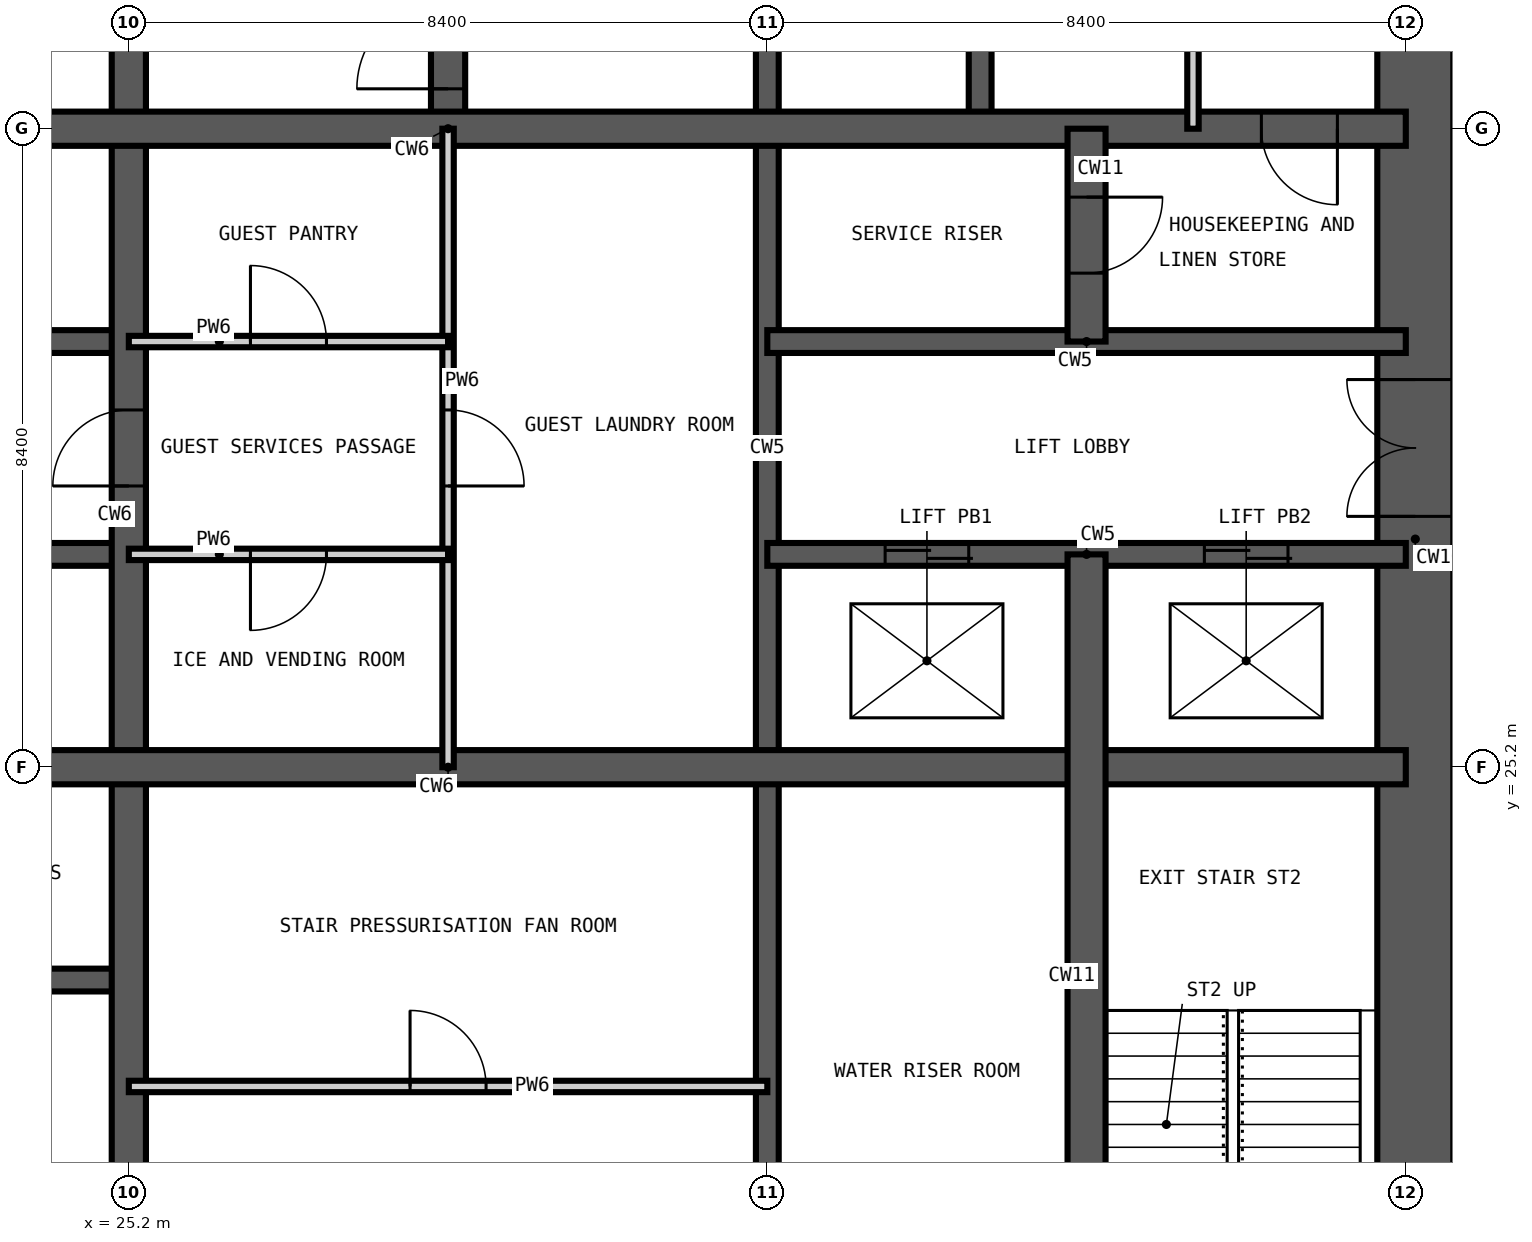
"""IFC4 building model, lengths in metres.
Left out: names, types, materials, properties, quantities, classifications, styles, units other than length and angle.
Written with IfcOpenShell. Run it as: python <this file> out.ifc"""

import sys

from ifc_helpers import new_model, si_unit, direction, frame, frame_2d, origin, place, context, subcontext, project, spatial, rectangle, extrude, element, fill, save


model = new_model("IFC4")
c1 = context("Model", 3, precision=1e-05, world=origin(), true_north=direction((0.0, 1.0)))
c2 = subcontext(c1, "Body", "Model", "MODEL_VIEW")
j1 = project(units=[si_unit("LENGTHUNIT", "METRE"), si_unit("PLANEANGLEUNIT", "RADIAN")], contexts=[c1])
p1 = place(None, origin())
s1 = spatial("IfcSite", under=j1, at=p1, CompositionType="ELEMENT")
p2 = place(p1, origin())
s2 = spatial("IfcBuilding", under=s1, at=p2, CompositionType="ELEMENT")
p3 = place(p2, frame((0.0, 0.0, 122.4)))
s3 = spatial("IfcBuildingStorey", under=s2, at=p3, CompositionType="ELEMENT", Elevation=122.4)
p4 = place(p3, frame((42.125, 17.175, -0.35), z_axis=(0.0, 0.0, 1.0), x_axis=(0.0, 1.0, 0.0)))
e1 = element("IfcWall", 1, at=p4, inside=s3, PredefinedType="SHEAR", context=c2, shape_type="SweptSolid", body=[
    extrude(rectangle(XDim=24.45, YDim=1.0, at=frame_2d((12.225, 0.0))), origin(), (0.0, 0.0, 1.0), 3.6),
])
p5 = place(p4, frame((0.425, 0.0, 0.35)))
e2 = element("IfcOpeningElement", 2, at=p5, cuts=e1, PredefinedType="OPENING", context=c2, shape_type="SweptSolid", body=[
    extrude(rectangle(XDim=1.2, YDim=2.2, at=frame_2d((0.6, 1.1))), frame((0.0, 0.51, 0.0), z_axis=(0.0, -1.0, 0.0), x_axis=(1.0, 0.0, 0.0)), (0.0, 0.0, 1.0), 1.02),
])
p6 = place(p4, frame((11.325, 0.0, 0.35)))
e3 = element("IfcOpeningElement", 3, at=p6, cuts=e1, PredefinedType="OPENING", context=c2, shape_type="SweptSolid", body=[
    extrude(rectangle(XDim=1.8, YDim=2.2, at=frame_2d((0.9, 1.1))), frame((0.0, 0.51, 0.0), z_axis=(0.0, -1.0, 0.0), x_axis=(1.0, 0.0, 0.0)), (0.0, 0.0, 1.0), 1.02),
])
p7 = place(p4, frame((20.125, 0.0, 0.35)))
e4 = element("IfcOpeningElement", 4, at=p7, cuts=e1, PredefinedType="OPENING", context=c2, shape_type="SweptSolid", body=[
    extrude(rectangle(XDim=1.0, YDim=2.1, at=frame_2d((0.5, 1.05))), frame((0.0, 0.51, 0.0), z_axis=(0.0, -1.0, 0.0), x_axis=(1.0, 0.0, 0.0)), (0.0, 0.0, 1.0), 1.02),
])
p8 = place(p3, frame((33.6, 16.8, -0.35), z_axis=(0.0, 0.0, 1.0), x_axis=(0.0, 1.0, 0.0)))
e5 = element("IfcWall", 5, at=p8, inside=s3, PredefinedType="SHEAR", context=c2, shape_type="SweptSolid", body=[
    extrude(rectangle(XDim=25.2, YDim=0.3, at=frame_2d((12.6, 0.0))), origin(), (0.0, 0.0, 1.0), 3.6),
])
p9 = place(p8, frame((22.5, 0.0, 0.35)))
e6 = element("IfcOpeningElement", 6, at=p9, cuts=e5, PredefinedType="OPENING", context=c2, shape_type="SweptSolid", body=[
    extrude(rectangle(XDim=1.2, YDim=2.2, at=frame_2d((0.6, 1.1))), frame((0.0, 0.16, 0.0), z_axis=(0.0, -1.0, 0.0), x_axis=(1.0, 0.0, 0.0)), (0.0, 0.0, 1.0), 0.32),
])
p10 = place(p8, frame((18.3, 0.0, 0.35)))
e7 = element("IfcOpeningElement", 7, at=p10, cuts=e5, PredefinedType="OPENING", context=c2, shape_type="SweptSolid", body=[
    extrude(rectangle(XDim=1.2, YDim=2.2, at=frame_2d((0.6, 1.1))), frame((0.0, 0.16, 0.0), z_axis=(0.0, -1.0, 0.0), x_axis=(1.0, 0.0, 0.0)), (0.0, 0.0, 1.0), 0.32),
])
for number, where, z_axis, x_axis in (
    (8, (36.4, 33.6, -0.35), (0.0, 0.0, 1.0), (0.0, 1.0, 0.0)),
    (9, (16.8, 22.4, -0.35), (0.0, 0.0, 1.0), (1.0, 0.0, 0.0)),
):
    element("IfcWall", number, at=place(p3, frame(where, z_axis=z_axis, x_axis=x_axis)), inside=s3, PredefinedType="SHEAR", context=c2, shape_type="SweptSolid", body=[
        extrude(rectangle(XDim=8.4, YDim=0.3, at=frame_2d((4.2, 0.0))), origin(), (0.0, 0.0, 1.0), 3.6),
    ])
p11 = place(p3, frame((16.8, 28.0, -0.35), z_axis=(0.0, 0.0, 1.0), x_axis=(1.0, 0.0, 0.0)))
e10 = element("IfcWall", 10, at=p11, inside=s3, PredefinedType="SHEAR", context=c2, shape_type="SweptSolid", body=[
    extrude(rectangle(XDim=8.4, YDim=0.3, at=frame_2d((4.2, 0.0))), origin(), (0.0, 0.0, 1.0), 3.6),
])
p12 = place(p11, frame((1.55, 0.0, 0.35)))
e11 = element("IfcOpeningElement", 11, at=p12, cuts=e10, PredefinedType="OPENING", context=c2, shape_type="SweptSolid", body=[
    extrude(rectangle(XDim=1.1, YDim=2.2, at=frame_2d((0.55, 1.1))), frame((0.0, 0.16, 0.0), z_axis=(0.0, -1.0, 0.0), x_axis=(1.0, 0.0, 0.0)), (0.0, 0.0, 1.0), 0.32),
])
p13 = place(p11, frame((5.75, 0.0, 0.35)))
e12 = element("IfcOpeningElement", 12, at=p13, cuts=e10, PredefinedType="OPENING", context=c2, shape_type="SweptSolid", body=[
    extrude(rectangle(XDim=1.1, YDim=2.2, at=frame_2d((0.55, 1.1))), frame((0.0, 0.16, 0.0), z_axis=(0.0, -1.0, 0.0), x_axis=(1.0, 0.0, 0.0)), (0.0, 0.0, 1.0), 0.32),
])
p14 = place(p3, frame((33.6, 28.0, -0.35), z_axis=(0.0, 0.0, 1.0), x_axis=(1.0, 0.0, 0.0)))
e13 = element("IfcWall", 13, at=p14, inside=s3, PredefinedType="SHEAR", context=c2, shape_type="SweptSolid", body=[
    extrude(rectangle(XDim=8.4, YDim=0.3, at=frame_2d((4.2, 0.0))), origin(), (0.0, 0.0, 1.0), 3.6),
])
p15 = place(p14, frame((1.55, 0.0, 0.35)))
e14 = element("IfcOpeningElement", 14, at=p15, cuts=e13, PredefinedType="OPENING", context=c2, shape_type="SweptSolid", body=[
    extrude(rectangle(XDim=1.1, YDim=2.2, at=frame_2d((0.55, 1.1))), frame((0.0, 0.16, 0.0), z_axis=(0.0, -1.0, 0.0), x_axis=(1.0, 0.0, 0.0)), (0.0, 0.0, 1.0), 0.32),
])
p16 = place(p14, frame((5.75, 0.0, 0.35)))
e15 = element("IfcOpeningElement", 15, at=p16, cuts=e13, PredefinedType="OPENING", context=c2, shape_type="SweptSolid", body=[
    extrude(rectangle(XDim=1.1, YDim=2.2, at=frame_2d((0.55, 1.1))), frame((0.0, 0.16, 0.0), z_axis=(0.0, -1.0, 0.0), x_axis=(1.0, 0.0, 0.0)), (0.0, 0.0, 1.0), 0.32),
])
p17 = place(p3, frame((16.8, 30.8, -0.35), z_axis=(0.0, 0.0, 1.0), x_axis=(1.0, 0.0, 0.0)))
e16 = element("IfcWall", 16, at=p17, inside=s3, PredefinedType="SHEAR", context=c2, shape_type="SweptSolid", body=[
    extrude(rectangle(XDim=8.4, YDim=0.3, at=frame_2d((4.2, 0.0))), origin(), (0.0, 0.0, 1.0), 3.6),
])
p18 = place(p17, frame((1.55, 0.0, 0.35)))
e17 = element("IfcOpeningElement", 17, at=p18, cuts=e16, PredefinedType="OPENING", context=c2, shape_type="SweptSolid", body=[
    extrude(rectangle(XDim=1.1, YDim=2.2, at=frame_2d((0.55, 1.1))), frame((0.0, 0.16, 0.0), z_axis=(0.0, -1.0, 0.0), x_axis=(1.0, 0.0, 0.0)), (0.0, 0.0, 1.0), 0.32),
])
p19 = place(p17, frame((5.75, 0.0, 0.35)))
e18 = element("IfcOpeningElement", 18, at=p19, cuts=e16, PredefinedType="OPENING", context=c2, shape_type="SweptSolid", body=[
    extrude(rectangle(XDim=1.1, YDim=2.2, at=frame_2d((0.55, 1.1))), frame((0.0, 0.16, 0.0), z_axis=(0.0, -1.0, 0.0), x_axis=(1.0, 0.0, 0.0)), (0.0, 0.0, 1.0), 0.32),
])
p20 = place(p3, frame((33.6, 30.8, -0.35), z_axis=(0.0, 0.0, 1.0), x_axis=(1.0, 0.0, 0.0)))
e19 = element("IfcWall", 19, at=p20, inside=s3, PredefinedType="SHEAR", context=c2, shape_type="SweptSolid", body=[
    extrude(rectangle(XDim=8.4, YDim=0.3, at=frame_2d((4.2, 0.0))), origin(), (0.0, 0.0, 1.0), 3.6),
])
p21 = place(p3, frame((25.2, 16.8, -0.35), z_axis=(0.0, 0.0, 1.0), x_axis=(0.0, 1.0, 0.0)))
e20 = element("IfcWall", 20, at=p21, inside=s3, PredefinedType="SHEAR", context=c2, shape_type="SweptSolid", body=[
    extrude(rectangle(XDim=25.2, YDim=0.45, at=frame_2d((12.6, 0.0))), origin(), (0.0, 0.0, 1.0), 3.6),
])
p22 = place(p21, frame((12.1, 0.0, 0.35)))
e21 = element("IfcOpeningElement", 21, at=p22, cuts=e20, PredefinedType="OPENING", context=c2, shape_type="SweptSolid", body=[
    extrude(rectangle(XDim=1.0, YDim=2.1, at=frame_2d((0.5, 1.05))), frame((0.0, 0.235, 0.0), z_axis=(0.0, -1.0, 0.0), x_axis=(1.0, 0.0, 0.0)), (0.0, 0.0, 1.0), 0.47),
])
p23 = place(p3, frame((29.4, 33.6, -0.35), z_axis=(0.0, 0.0, 1.0), x_axis=(0.0, 1.0, 0.0)))
e22 = element("IfcWall", 22, at=p23, inside=s3, PredefinedType="SHEAR", context=c2, shape_type="SweptSolid", body=[
    extrude(rectangle(XDim=8.4, YDim=0.45, at=frame_2d((4.2, 0.0))), origin(), (0.0, 0.0, 1.0), 3.6),
])
p24 = place(p23, frame((0.525, 0.0, 0.35)))
e23 = element("IfcOpeningElement", 23, at=p24, cuts=e22, PredefinedType="OPENING", context=c2, shape_type="SweptSolid", body=[
    extrude(rectangle(XDim=1.2, YDim=2.2, at=frame_2d((0.6, 1.1))), frame((0.0, 0.235, 0.0), z_axis=(0.0, -1.0, 0.0), x_axis=(1.0, 0.0, 0.0)), (0.0, 0.0, 1.0), 0.47),
])
p25 = place(p3, frame((16.8, 25.2, -0.35), z_axis=(0.0, 0.0, 1.0), x_axis=(1.0, 0.0, 0.0)))
e24 = element("IfcWall", 24, at=p25, inside=s3, PredefinedType="SHEAR", context=c2, shape_type="SweptSolid", body=[
    extrude(rectangle(XDim=25.2, YDim=0.45, at=frame_2d((12.6, 0.0))), origin(), (0.0, 0.0, 1.0), 3.6),
])
p26 = place(p3, frame((16.8, 33.6, -0.35), z_axis=(0.0, 0.0, 1.0), x_axis=(1.0, 0.0, 0.0)))
e25 = element("IfcWall", 25, at=p26, inside=s3, PredefinedType="SHEAR", context=c2, shape_type="SweptSolid", body=[
    extrude(rectangle(XDim=25.2, YDim=0.45, at=frame_2d((12.6, 0.0))), origin(), (0.0, 0.0, 1.0), 3.6),
])
p27 = place(p26, frame((23.3, 0.0, 0.35)))
e26 = element("IfcOpeningElement", 26, at=p27, cuts=e25, PredefinedType="OPENING", context=c2, shape_type="SweptSolid", body=[
    extrude(rectangle(XDim=1.0, YDim=2.1, at=frame_2d((0.5, 1.05))), frame((0.0, 0.235, 0.0), z_axis=(0.0, -1.0, 0.0), x_axis=(1.0, 0.0, 0.0)), (0.0, 0.0, 1.0), 0.47),
])
p28 = place(p3, frame((37.8, 16.8, -0.35), z_axis=(0.0, 0.0, 1.0), x_axis=(0.0, 1.0, 0.0)))
e27 = element("IfcWall", 27, at=p28, inside=s3, PredefinedType="SHEAR", context=c2, shape_type="SweptSolid", body=[
    extrude(rectangle(XDim=11.2, YDim=0.5, at=frame_2d((5.6, 0.0))), origin(), (0.0, 0.0, 1.0), 3.6),
])
p29 = place(p3, frame((37.8, 30.8, -0.35), z_axis=(0.0, 0.0, 1.0), x_axis=(0.0, 1.0, 0.0)))
e28 = element("IfcWall", 28, at=p29, inside=s3, PredefinedType="SHEAR", context=c2, shape_type="SweptSolid", body=[
    extrude(rectangle(XDim=2.8, YDim=0.5, at=frame_2d((1.4, 0.0))), origin(), (0.0, 0.0, 1.0), 3.6),
])
p30 = place(p29, frame((0.9, 0.0, 0.35)))
e29 = element("IfcOpeningElement", 29, at=p30, cuts=e28, PredefinedType="OPENING", context=c2, shape_type="SweptSolid", body=[
    extrude(rectangle(XDim=1.0, YDim=2.1, at=frame_2d((0.5, 1.05))), frame((0.0, 0.26, 0.0), z_axis=(0.0, -1.0, 0.0), x_axis=(1.0, 0.0, 0.0)), (0.0, 0.0, 1.0), 0.52),
])
p31 = place(p3, frame((29.4, 25.2, 0.0), z_axis=(0.0, 0.0, 1.0), x_axis=(0.0, 1.0, 0.0)))
e30 = element("IfcWall", 30, at=p31, inside=s3, PredefinedType="PARTITIONING", context=c2, shape_type="SweptSolid", body=[
    extrude(rectangle(XDim=8.4, YDim=0.15, at=frame_2d((4.2, 0.0))), origin(), (0.0, 0.0, 1.0), 3.25),
])
p32 = place(p31, frame((3.7, 0.0, 0.0)))
e31 = element("IfcOpeningElement", 31, at=p32, cuts=e30, PredefinedType="OPENING", context=c2, shape_type="SweptSolid", body=[
    extrude(rectangle(XDim=1.0, YDim=2.1, at=frame_2d((0.5, 1.05))), frame((0.0, 0.085, 0.0), z_axis=(0.0, -1.0, 0.0), x_axis=(1.0, 0.0, 0.0)), (0.0, 0.0, 1.0), 0.17),
])
p33 = place(p3, frame((39.2, 33.6, 0.0), z_axis=(0.0, 0.0, 1.0), x_axis=(0.0, 1.0, 0.0)))
e32 = element("IfcWall", 32, at=p33, inside=s3, PredefinedType="PARTITIONING", context=c2, shape_type="SweptSolid", body=[
    extrude(rectangle(XDim=8.4, YDim=0.15, at=frame_2d((4.2, 0.0))), origin(), (0.0, 0.0, 1.0), 3.25),
])
p34 = place(p33, frame((3.7, 0.0, 0.0)))
e33 = element("IfcOpeningElement", 33, at=p34, cuts=e32, PredefinedType="OPENING", context=c2, shape_type="SweptSolid", body=[
    extrude(rectangle(XDim=1.0, YDim=2.1, at=frame_2d((0.5, 1.05))), frame((0.0, 0.085, 0.0), z_axis=(0.0, -1.0, 0.0), x_axis=(1.0, 0.0, 0.0)), (0.0, 0.0, 1.0), 0.17),
])
p35 = place(p3, frame((25.2, 21.0, 0.0), z_axis=(0.0, 0.0, 1.0), x_axis=(1.0, 0.0, 0.0)))
e34 = element("IfcWall", 34, at=p35, inside=s3, PredefinedType="PARTITIONING", context=c2, shape_type="SweptSolid", body=[
    extrude(rectangle(XDim=8.4, YDim=0.15, at=frame_2d((4.2, 0.0))), origin(), (0.0, 0.0, 1.0), 3.25),
])
p36 = place(p35, frame((3.7, 0.0, 0.0)))
e35 = element("IfcOpeningElement", 35, at=p36, cuts=e34, PredefinedType="OPENING", context=c2, shape_type="SweptSolid", body=[
    extrude(rectangle(XDim=1.0, YDim=2.1, at=frame_2d((0.5, 1.05))), frame((0.0, 0.085, 0.0), z_axis=(0.0, -1.0, 0.0), x_axis=(1.0, 0.0, 0.0)), (0.0, 0.0, 1.0), 0.17),
])
p37 = place(p3, frame((25.2, 28.0, 0.0), z_axis=(0.0, 0.0, 1.0), x_axis=(1.0, 0.0, 0.0)))
e36 = element("IfcWall", 36, at=p37, inside=s3, PredefinedType="PARTITIONING", context=c2, shape_type="SweptSolid", body=[
    extrude(rectangle(XDim=4.2, YDim=0.15, at=frame_2d((2.1, 0.0))), origin(), (0.0, 0.0, 1.0), 3.25),
])
p38 = place(p37, frame((1.6, 0.0, 0.0)))
e37 = element("IfcOpeningElement", 37, at=p38, cuts=e36, PredefinedType="OPENING", context=c2, shape_type="SweptSolid", body=[
    extrude(rectangle(XDim=1.0, YDim=2.1, at=frame_2d((0.5, 1.05))), frame((0.0, 0.085, 0.0), z_axis=(0.0, -1.0, 0.0), x_axis=(1.0, 0.0, 0.0)), (0.0, 0.0, 1.0), 0.17),
])
p39 = place(p3, frame((25.2, 30.8, 0.0), z_axis=(0.0, 0.0, 1.0), x_axis=(1.0, 0.0, 0.0)))
e38 = element("IfcWall", 38, at=p39, inside=s3, PredefinedType="PARTITIONING", context=c2, shape_type="SweptSolid", body=[
    extrude(rectangle(XDim=4.2, YDim=0.15, at=frame_2d((2.1, 0.0))), origin(), (0.0, 0.0, 1.0), 3.25),
])
p40 = place(p39, frame((1.6, 0.0, 0.0)))
e39 = element("IfcOpeningElement", 39, at=p40, cuts=e38, PredefinedType="OPENING", context=c2, shape_type="SweptSolid", body=[
    extrude(rectangle(XDim=1.0, YDim=2.1, at=frame_2d((0.5, 1.05))), frame((0.0, 0.085, 0.0), z_axis=(0.0, -1.0, 0.0), x_axis=(1.0, 0.0, 0.0)), (0.0, 0.0, 1.0), 0.17),
])
p41 = place(p24, origin())
e40 = element("IfcDoor", 40, at=p41, inside=s3, OperationType="SINGLE_SWING_LEFT", PredefinedType="DOOR", context=c2, shape_type="SweptSolid", body=[
    extrude(rectangle(XDim=1.2, YDim=2.2, at=frame_2d((0.6, 1.1))), frame((0.0, 0.025, 0.0), z_axis=(0.0, -1.0, 0.0), x_axis=(1.0, 0.0, 0.0)), (0.0, 0.0, 1.0), 0.05),
])
fill(e23, e40)
p42 = place(p15, origin())
e41 = element("IfcDoor", 41, at=p42, inside=s3, OperationType="DOUBLE_DOOR_SLIDING", PredefinedType="DOOR", context=c2, shape_type="SweptSolid", body=[
    extrude(rectangle(XDim=1.1, YDim=2.2, at=frame_2d((0.55, 1.1))), frame((0.0, 0.025, 0.0), z_axis=(0.0, -1.0, 0.0), x_axis=(1.0, 0.0, 0.0)), (0.0, 0.0, 1.0), 0.05),
])
fill(e14, e41)
p43 = place(p16, origin())
e42 = element("IfcDoor", 42, at=p43, inside=s3, OperationType="DOUBLE_DOOR_SLIDING", PredefinedType="DOOR", context=c2, shape_type="SweptSolid", body=[
    extrude(rectangle(XDim=1.1, YDim=2.2, at=frame_2d((0.55, 1.1))), frame((0.0, 0.025, 0.0), z_axis=(0.0, -1.0, 0.0), x_axis=(1.0, 0.0, 0.0)), (0.0, 0.0, 1.0), 0.05),
])
fill(e15, e42)
p44 = place(p22, origin())
e43 = element("IfcDoor", 43, at=p44, inside=s3, OperationType="SINGLE_SWING_LEFT", PredefinedType="DOOR", context=c2, shape_type="SweptSolid", body=[
    extrude(rectangle(XDim=1.0, YDim=2.1, at=frame_2d((0.5, 1.05))), frame((0.0, 0.025, 0.0), z_axis=(0.0, -1.0, 0.0), x_axis=(1.0, 0.0, 0.0)), (0.0, 0.0, 1.0), 0.05),
])
fill(e21, e43)
p45 = place(p38, frame((1.0, 0.0, 0.0), z_axis=(0.0, 0.0, 1.0), x_axis=(-1.0, 0.0, 0.0)))
e44 = element("IfcDoor", 44, at=p45, inside=s3, OperationType="SINGLE_SWING_RIGHT", PredefinedType="DOOR", context=c2, shape_type="SweptSolid", body=[
    extrude(rectangle(XDim=1.0, YDim=2.1, at=frame_2d((0.5, 1.05))), frame((0.0, 0.025, 0.0), z_axis=(0.0, -1.0, 0.0), x_axis=(1.0, 0.0, 0.0)), (0.0, 0.0, 1.0), 0.05),
])
fill(e37, e44)
p46 = place(p40, origin())
e45 = element("IfcDoor", 45, at=p46, inside=s3, OperationType="SINGLE_SWING_LEFT", PredefinedType="DOOR", context=c2, shape_type="SweptSolid", body=[
    extrude(rectangle(XDim=1.0, YDim=2.1, at=frame_2d((0.5, 1.05))), frame((0.0, 0.025, 0.0), z_axis=(0.0, -1.0, 0.0), x_axis=(1.0, 0.0, 0.0)), (0.0, 0.0, 1.0), 0.05),
])
fill(e39, e45)
p47 = place(p32, frame((1.0, 0.0, 0.0), z_axis=(0.0, 0.0, 1.0), x_axis=(-1.0, 0.0, 0.0)))
e46 = element("IfcDoor", 46, at=p47, inside=s3, OperationType="SINGLE_SWING_RIGHT", PredefinedType="DOOR", context=c2, shape_type="SweptSolid", body=[
    extrude(rectangle(XDim=1.0, YDim=2.1, at=frame_2d((0.5, 1.05))), frame((0.0, 0.025, 0.0), z_axis=(0.0, -1.0, 0.0), x_axis=(1.0, 0.0, 0.0)), (0.0, 0.0, 1.0), 0.05),
])
fill(e31, e46)
p48 = place(p30, frame((1.0, 0.0, 0.0), z_axis=(0.0, 0.0, 1.0), x_axis=(-1.0, 0.0, 0.0)))
e47 = element("IfcDoor", 47, at=p48, inside=s3, OperationType="SINGLE_SWING_LEFT", PredefinedType="DOOR", context=c2, shape_type="SweptSolid", body=[
    extrude(rectangle(XDim=1.0, YDim=2.1, at=frame_2d((0.5, 1.05))), frame((0.0, 0.025, 0.0), z_axis=(0.0, -1.0, 0.0), x_axis=(1.0, 0.0, 0.0)), (0.0, 0.0, 1.0), 0.05),
])
fill(e29, e47)
p49 = place(p27, frame((1.0, 0.0, 0.0), z_axis=(0.0, 0.0, 1.0), x_axis=(-1.0, 0.0, 0.0)))
e48 = element("IfcDoor", 48, at=p49, inside=s3, OperationType="SINGLE_SWING_LEFT", PredefinedType="DOOR", context=c2, shape_type="SweptSolid", body=[
    extrude(rectangle(XDim=1.0, YDim=2.1, at=frame_2d((0.5, 1.05))), frame((0.0, 0.025, 0.0), z_axis=(0.0, -1.0, 0.0), x_axis=(1.0, 0.0, 0.0)), (0.0, 0.0, 1.0), 0.05),
])
fill(e26, e48)
p50 = place(p6, origin())
e49 = element("IfcDoor", 49, at=p50, inside=s3, OperationType="DOUBLE_DOOR_DOUBLE_SWING", PredefinedType="DOOR", context=c2, shape_type="SweptSolid", body=[
    extrude(rectangle(XDim=1.8, YDim=2.2, at=frame_2d((0.9, 1.1))), frame((0.0, 0.025, 0.0), z_axis=(0.0, -1.0, 0.0), x_axis=(1.0, 0.0, 0.0)), (0.0, 0.0, 1.0), 0.05),
])
fill(e3, e49)
p51 = place(p36, origin())
e50 = element("IfcDoor", 50, at=p51, inside=s3, OperationType="SINGLE_SWING_LEFT", PredefinedType="DOOR", context=c2, shape_type="SweptSolid", body=[
    extrude(rectangle(XDim=1.0, YDim=2.1, at=frame_2d((0.5, 1.05))), frame((0.0, 0.025, 0.0), z_axis=(0.0, -1.0, 0.0), x_axis=(1.0, 0.0, 0.0)), (0.0, 0.0, 1.0), 0.05),
])
fill(e35, e50)
save(model, sys.argv[1])
